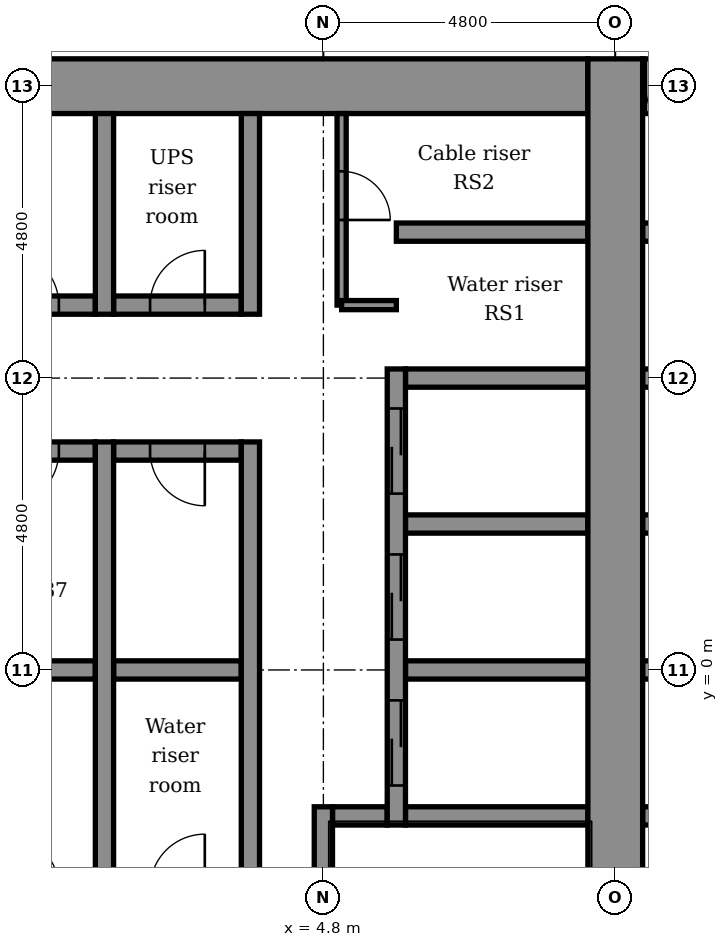
"""IFC4 building model, lengths in metres.
Left out: names, types, materials, properties, quantities, classifications, styles, units other than length and angle.
Written with IfcOpenShell. Run it as: python <this file> out.ifc"""

import sys

from ifc_helpers import new_model, si_unit, direction, frame, frame_2d, origin, place, context, subcontext, project, spatial, rectangle, extrude, element, fill, save


model = new_model("IFC4")
c1 = context("Model", 3, precision=1e-05, world=origin(), true_north=direction((0.0, 1.0)))
c2 = subcontext(c1, "Body", "Model", "MODEL_VIEW")
j1 = project(units=[si_unit("LENGTHUNIT", "METRE"), si_unit("PLANEANGLEUNIT", "RADIAN")], contexts=[c1])
p1 = place(None, origin())
s1 = spatial("IfcSite", under=j1, at=p1, CompositionType="ELEMENT")
p2 = place(p1, origin())
s2 = spatial("IfcBuilding", under=s1, at=p2, CompositionType="ELEMENT")
p3 = place(p2, frame((0.0, 0.0, 95.9)))
s3 = spatial("IfcBuildingStorey", under=s2, at=p3, CompositionType="ELEMENT", Elevation=95.9)
p4 = place(p3, frame((4.95, -2.4, -0.2), z_axis=(0.0, 0.0, 1.0), x_axis=(1.0, 0.0, 0.0)))
e1 = element("IfcWall", 1, at=p4, inside=s3, PredefinedType="STANDARD", context=c2, shape_type="SweptSolid", body=[
    extrude(rectangle(XDim=0.9, YDim=0.3, at=frame_2d((0.45, 0.0))), origin(), (0.0, 0.0, 1.0), 4.5),
])
p5 = place(p3, frame((6.15, -2.4, -0.2), z_axis=(0.0, 0.0, 1.0), x_axis=(1.0, 0.0, 0.0)))
e2 = element("IfcWall", 2, at=p5, inside=s3, PredefinedType="STANDARD", context=c2, shape_type="SweptSolid", body=[
    extrude(rectangle(XDim=3.0, YDim=0.3, at=frame_2d((1.5, 0.0))), origin(), (0.0, 0.0, 1.0), 4.5),
])
p6 = place(p3, frame((10.05, -2.4, -0.2), z_axis=(0.0, 0.0, 1.0), x_axis=(1.0, 0.0, 0.0)))
e3 = element("IfcWall", 3, at=p6, inside=s3, PredefinedType="STANDARD", context=c2, shape_type="SweptSolid", body=[
    extrude(rectangle(XDim=3.9, YDim=0.3, at=frame_2d((1.95, 0.0))), origin(), (0.0, 0.0, 1.0), 4.5),
])
p7 = place(p3, frame((-1.05, 0.0, -0.2), z_axis=(0.0, 0.0, 1.0), x_axis=(1.0, 0.0, 0.0)))
e4 = element("IfcWall", 4, at=p7, inside=s3, PredefinedType="STANDARD", context=c2, shape_type="SweptSolid", body=[
    extrude(rectangle(XDim=2.1, YDim=0.3, at=frame_2d((1.05, 0.0))), origin(), (0.0, 0.0, 1.0), 4.5),
])
p8 = place(p3, frame((1.35, 0.0, -0.2), z_axis=(0.0, 0.0, 1.0), x_axis=(1.0, 0.0, 0.0)))
e5 = element("IfcWall", 5, at=p8, inside=s3, PredefinedType="STANDARD", context=c2, shape_type="SweptSolid", body=[
    extrude(rectangle(XDim=2.1, YDim=0.3, at=frame_2d((1.05, 0.0))), origin(), (0.0, 0.0, 1.0), 4.5),
])
p9 = place(p3, frame((6.15, 0.0, -0.2), z_axis=(0.0, 0.0, 1.0), x_axis=(1.0, 0.0, 0.0)))
e6 = element("IfcWall", 6, at=p9, inside=s3, PredefinedType="STANDARD", context=c2, shape_type="SweptSolid", body=[
    extrude(rectangle(XDim=3.0, YDim=0.3, at=frame_2d((1.5, 0.0))), origin(), (0.0, 0.0, 1.0), 4.5),
])
p10 = place(p3, frame((10.05, 0.0, -0.2), z_axis=(0.0, 0.0, 1.0), x_axis=(1.0, 0.0, 0.0)))
e7 = element("IfcWall", 7, at=p10, inside=s3, PredefinedType="STANDARD", context=c2, shape_type="SweptSolid", body=[
    extrude(rectangle(XDim=3.9, YDim=0.3, at=frame_2d((1.95, 0.0))), origin(), (0.0, 0.0, 1.0), 4.5),
])
p11 = place(p3, frame((6.15, 2.4, -0.2), z_axis=(0.0, 0.0, 1.0), x_axis=(1.0, 0.0, 0.0)))
e8 = element("IfcWall", 8, at=p11, inside=s3, PredefinedType="STANDARD", context=c2, shape_type="SweptSolid", body=[
    extrude(rectangle(XDim=3.0, YDim=0.3, at=frame_2d((1.5, 0.0))), origin(), (0.0, 0.0, 1.0), 4.5),
])
p12 = place(p3, frame((10.05, 2.4, -0.2), z_axis=(0.0, 0.0, 1.0), x_axis=(1.0, 0.0, 0.0)))
e9 = element("IfcWall", 9, at=p12, inside=s3, PredefinedType="STANDARD", context=c2, shape_type="SweptSolid", body=[
    extrude(rectangle(XDim=3.9, YDim=0.3, at=frame_2d((1.95, 0.0))), origin(), (0.0, 0.0, 1.0), 4.5),
])
p13 = place(p3, frame((-1.05, 3.6, -0.2), z_axis=(0.0, 0.0, 1.0), x_axis=(1.0, 0.0, 0.0)))
e10 = element("IfcWall", 10, at=p13, inside=s3, PredefinedType="STANDARD", context=c2, shape_type="SweptSolid", body=[
    extrude(rectangle(XDim=2.1, YDim=0.3, at=frame_2d((1.05, 0.0))), origin(), (0.0, 0.0, 1.0), 4.5),
])
p14 = place(p13, frame((0.6, 0.0, 0.2)))
e11 = element("IfcOpeningElement", 11, at=p14, cuts=e10, PredefinedType="OPENING", context=c2, shape_type="SweptSolid", body=[
    extrude(rectangle(XDim=0.9, YDim=2.1, at=frame_2d((0.45, 1.05))), frame((0.0, 0.16, 0.0), z_axis=(0.0, -1.0, 0.0), x_axis=(1.0, 0.0, 0.0)), (0.0, 0.0, 1.0), 0.32),
])
p15 = place(p3, frame((1.35, 3.6, -0.2), z_axis=(0.0, 0.0, 1.0), x_axis=(1.0, 0.0, 0.0)))
e12 = element("IfcWall", 12, at=p15, inside=s3, PredefinedType="STANDARD", context=c2, shape_type="SweptSolid", body=[
    extrude(rectangle(XDim=2.1, YDim=0.3, at=frame_2d((1.05, 0.0))), origin(), (0.0, 0.0, 1.0), 4.5),
])
p16 = place(p15, frame((0.6, 0.0, 0.2)))
e13 = element("IfcOpeningElement", 13, at=p16, cuts=e12, PredefinedType="OPENING", context=c2, shape_type="SweptSolid", body=[
    extrude(rectangle(XDim=0.9, YDim=2.1, at=frame_2d((0.45, 1.05))), frame((0.0, 0.16, 0.0), z_axis=(0.0, -1.0, 0.0), x_axis=(1.0, 0.0, 0.0)), (0.0, 0.0, 1.0), 0.32),
])
p17 = place(p3, frame((6.15, 4.8, -0.2), z_axis=(0.0, 0.0, 1.0), x_axis=(1.0, 0.0, 0.0)))
e14 = element("IfcWall", 14, at=p17, inside=s3, PredefinedType="STANDARD", context=c2, shape_type="SweptSolid", body=[
    extrude(rectangle(XDim=3.0, YDim=0.3, at=frame_2d((1.5, 0.0))), origin(), (0.0, 0.0, 1.0), 4.5),
])
p18 = place(p3, frame((10.05, 4.8, -0.2), z_axis=(0.0, 0.0, 1.0), x_axis=(1.0, 0.0, 0.0)))
e15 = element("IfcWall", 15, at=p18, inside=s3, PredefinedType="STANDARD", context=c2, shape_type="SweptSolid", body=[
    extrude(rectangle(XDim=3.9, YDim=0.3, at=frame_2d((1.95, 0.0))), origin(), (0.0, 0.0, 1.0), 4.5),
])
p19 = place(p3, frame((-1.05, 6.0, -0.2), z_axis=(0.0, 0.0, 1.0), x_axis=(1.0, 0.0, 0.0)))
e16 = element("IfcWall", 16, at=p19, inside=s3, PredefinedType="STANDARD", context=c2, shape_type="SweptSolid", body=[
    extrude(rectangle(XDim=2.1, YDim=0.3, at=frame_2d((1.05, 0.0))), origin(), (0.0, 0.0, 1.0), 4.5),
])
p20 = place(p19, frame((0.6, 0.0, 0.2)))
e17 = element("IfcOpeningElement", 17, at=p20, cuts=e16, PredefinedType="OPENING", context=c2, shape_type="SweptSolid", body=[
    extrude(rectangle(XDim=0.9, YDim=2.1, at=frame_2d((0.45, 1.05))), frame((0.0, 0.16, 0.0), z_axis=(0.0, -1.0, 0.0), x_axis=(1.0, 0.0, 0.0)), (0.0, 0.0, 1.0), 0.32),
])
p21 = place(p3, frame((1.35, 6.0, -0.2), z_axis=(0.0, 0.0, 1.0), x_axis=(1.0, 0.0, 0.0)))
e18 = element("IfcWall", 18, at=p21, inside=s3, PredefinedType="STANDARD", context=c2, shape_type="SweptSolid", body=[
    extrude(rectangle(XDim=2.1, YDim=0.3, at=frame_2d((1.05, 0.0))), origin(), (0.0, 0.0, 1.0), 4.5),
])
p22 = place(p21, frame((0.6, 0.0, 0.2)))
e19 = element("IfcOpeningElement", 19, at=p22, cuts=e18, PredefinedType="OPENING", context=c2, shape_type="SweptSolid", body=[
    extrude(rectangle(XDim=0.9, YDim=2.1, at=frame_2d((0.45, 1.05))), frame((0.0, 0.16, 0.0), z_axis=(0.0, -1.0, 0.0), x_axis=(1.0, 0.0, 0.0)), (0.0, 0.0, 1.0), 0.32),
])
p23 = place(p3, frame((6.0, 7.2, -0.2), z_axis=(0.0, 0.0, 1.0), x_axis=(1.0, 0.0, 0.0)))
e20 = element("IfcWall", 20, at=p23, inside=s3, PredefinedType="STANDARD", context=c2, shape_type="SweptSolid", body=[
    extrude(rectangle(XDim=3.15, YDim=0.3, at=frame_2d((1.575, 0.0))), origin(), (0.0, 0.0, 1.0), 4.5),
])
p24 = place(p3, frame((10.05, 7.2, -0.2), z_axis=(0.0, 0.0, 1.0), x_axis=(1.0, 0.0, 0.0)))
e21 = element("IfcWall", 21, at=p24, inside=s3, PredefinedType="STANDARD", context=c2, shape_type="SweptSolid", body=[
    extrude(rectangle(XDim=3.9, YDim=0.3, at=frame_2d((1.95, 0.0))), origin(), (0.0, 0.0, 1.0), 4.5),
])
p25 = place(p3, frame((-5.25, 9.6, -0.2), z_axis=(0.0, 0.0, 1.0), x_axis=(1.0, 0.0, 0.0)))
e22 = element("IfcWall", 22, at=p25, inside=s3, PredefinedType="SHEAR", context=c2, shape_type="SweptSolid", body=[
    extrude(rectangle(XDim=14.4, YDim=0.9, at=frame_2d((7.2, 0.0))), origin(), (0.0, 0.0, 1.0), 4.5),
])
p26 = place(p25, frame((0.6, 0.0, 0.2)))
e23 = element("IfcOpeningElement", 23, at=p26, cuts=e22, PredefinedType="OPENING", context=c2, shape_type="SweptSolid", body=[
    extrude(rectangle(XDim=0.9, YDim=2.1, at=frame_2d((0.45, 1.05))), frame((0.0, 0.46, 0.0), z_axis=(0.0, -1.0, 0.0), x_axis=(1.0, 0.0, 0.0)), (0.0, 0.0, 1.0), 0.92),
])
p27 = place(p3, frame((10.05, 9.6, -0.2), z_axis=(0.0, 0.0, 1.0), x_axis=(1.0, 0.0, 0.0)))
e24 = element("IfcWall", 24, at=p27, inside=s3, PredefinedType="SHEAR", context=c2, shape_type="SweptSolid", body=[
    extrude(rectangle(XDim=3.9, YDim=0.9, at=frame_2d((1.95, 0.0))), origin(), (0.0, 0.0, 1.0), 4.5),
])
p28 = place(p27, frame((0.05, 0.0, 0.2)))
e25 = element("IfcOpeningElement", 25, at=p28, cuts=e24, PredefinedType="OPENING", context=c2, shape_type="SweptSolid", body=[
    extrude(rectangle(XDim=0.9, YDim=2.1, at=frame_2d((0.45, 1.05))), frame((0.0, 0.46, 0.0), z_axis=(0.0, -1.0, 0.0), x_axis=(1.0, 0.0, 0.0)), (0.0, 0.0, 1.0), 0.92),
])
p29 = place(p27, frame((1.5, 0.0, 0.2)))
e26 = element("IfcOpeningElement", 26, at=p29, cuts=e24, PredefinedType="OPENING", context=c2, shape_type="SweptSolid", body=[
    extrude(rectangle(XDim=0.9, YDim=2.1, at=frame_2d((0.45, 1.05))), frame((0.0, 0.46, 0.0), z_axis=(0.0, -1.0, 0.0), x_axis=(1.0, 0.0, 0.0)), (0.0, 0.0, 1.0), 0.92),
])
p30 = place(p27, frame((2.95, 0.0, 0.2)))
e27 = element("IfcOpeningElement", 27, at=p30, cuts=e24, PredefinedType="OPENING", context=c2, shape_type="SweptSolid", body=[
    extrude(rectangle(XDim=0.9, YDim=2.1, at=frame_2d((0.45, 1.05))), frame((0.0, 0.46, 0.0), z_axis=(0.0, -1.0, 0.0), x_axis=(1.0, 0.0, 0.0)), (0.0, 0.0, 1.0), 0.92),
])
p31 = place(p3, frame((1.2, -3.75, -0.2), z_axis=(0.0, 0.0, 1.0), x_axis=(0.0, 1.0, 0.0)))
e28 = element("IfcWall", 28, at=p31, inside=s3, PredefinedType="STANDARD", context=c2, shape_type="SweptSolid", body=[
    extrude(rectangle(XDim=7.5, YDim=0.3, at=frame_2d((3.75, 0.0))), origin(), (0.0, 0.0, 1.0), 4.5),
])
p32 = place(p3, frame((1.2, 5.85, -0.2), z_axis=(0.0, 0.0, 1.0), x_axis=(0.0, 1.0, 0.0)))
e29 = element("IfcWall", 29, at=p32, inside=s3, PredefinedType="STANDARD", context=c2, shape_type="SweptSolid", body=[
    extrude(rectangle(XDim=3.3, YDim=0.3, at=frame_2d((1.65, 0.0))), origin(), (0.0, 0.0, 1.0), 4.5),
])
p33 = place(p3, frame((3.6, -3.75, -0.2), z_axis=(0.0, 0.0, 1.0), x_axis=(0.0, 1.0, 0.0)))
e30 = element("IfcWall", 30, at=p33, inside=s3, PredefinedType="STANDARD", context=c2, shape_type="SweptSolid", body=[
    extrude(rectangle(XDim=7.5, YDim=0.3, at=frame_2d((3.75, 0.0))), origin(), (0.0, 0.0, 1.0), 4.5),
])
p34 = place(p3, frame((3.6, 5.85, -0.2), z_axis=(0.0, 0.0, 1.0), x_axis=(0.0, 1.0, 0.0)))
e31 = element("IfcWall", 31, at=p34, inside=s3, PredefinedType="STANDARD", context=c2, shape_type="SweptSolid", body=[
    extrude(rectangle(XDim=3.3, YDim=0.3, at=frame_2d((1.65, 0.0))), origin(), (0.0, 0.0, 1.0), 4.5),
])
p35 = place(p3, frame((4.8, -9.15, -0.2), z_axis=(0.0, 0.0, 1.0), x_axis=(0.0, 1.0, 0.0)))
e32 = element("IfcWall", 32, at=p35, inside=s3, PredefinedType="STANDARD", context=c2, shape_type="SweptSolid", body=[
    extrude(rectangle(XDim=6.9, YDim=0.3, at=frame_2d((3.45, 0.0))), origin(), (0.0, 0.0, 1.0), 4.5),
])
p36 = place(p35, frame((3.7, 0.0, 0.2)))
e33 = element("IfcOpeningElement", 33, at=p36, cuts=e32, PredefinedType="OPENING", context=c2, shape_type="SweptSolid", body=[
    extrude(rectangle(XDim=1.2, YDim=2.1, at=frame_2d((0.6, 1.05))), frame((0.0, 0.16, 0.0), z_axis=(0.0, -1.0, 0.0), x_axis=(1.0, 0.0, 0.0)), (0.0, 0.0, 1.0), 0.32),
])
p37 = place(p3, frame((6.0, -2.55, -0.2), z_axis=(0.0, 0.0, 1.0), x_axis=(0.0, 1.0, 0.0)))
e34 = element("IfcWall", 34, at=p37, inside=s3, PredefinedType="STANDARD", context=c2, shape_type="SweptSolid", body=[
    extrude(rectangle(XDim=7.5, YDim=0.3, at=frame_2d((3.75, 0.0))), origin(), (0.0, 0.0, 1.0), 4.5),
])
p38 = place(p37, frame((0.65, 0.0, 0.2)))
e35 = element("IfcOpeningElement", 35, at=p38, cuts=e34, PredefinedType="OPENING", context=c2, shape_type="SweptSolid", body=[
    extrude(rectangle(XDim=1.4, YDim=2.1, at=frame_2d((0.7, 1.05))), frame((0.0, 0.16, 0.0), z_axis=(0.0, -1.0, 0.0), x_axis=(1.0, 0.0, 0.0)), (0.0, 0.0, 1.0), 0.32),
])
p39 = place(p37, frame((3.05, 0.0, 0.2)))
e36 = element("IfcOpeningElement", 36, at=p39, cuts=e34, PredefinedType="OPENING", context=c2, shape_type="SweptSolid", body=[
    extrude(rectangle(XDim=1.4, YDim=2.1, at=frame_2d((0.7, 1.05))), frame((0.0, 0.16, 0.0), z_axis=(0.0, -1.0, 0.0), x_axis=(1.0, 0.0, 0.0)), (0.0, 0.0, 1.0), 0.32),
])
p40 = place(p37, frame((5.45, 0.0, 0.2)))
e37 = element("IfcOpeningElement", 37, at=p40, cuts=e34, PredefinedType="OPENING", context=c2, shape_type="SweptSolid", body=[
    extrude(rectangle(XDim=1.4, YDim=2.1, at=frame_2d((0.7, 1.05))), frame((0.0, 0.16, 0.0), z_axis=(0.0, -1.0, 0.0), x_axis=(1.0, 0.0, 0.0)), (0.0, 0.0, 1.0), 0.32),
])
p41 = place(p3, frame((9.6, -10.15, -0.2), z_axis=(0.0, 0.0, 1.0), x_axis=(0.0, 1.0, 0.0)))
e38 = element("IfcWall", 38, at=p41, inside=s3, PredefinedType="SHEAR", context=c2, shape_type="SweptSolid", body=[
    extrude(rectangle(XDim=20.2, YDim=0.9, at=frame_2d((10.1, 0.0))), origin(), (0.0, 0.0, 1.0), 4.5),
])
p42 = place(p3, frame((5.1, 6.0, 0.0), z_axis=(0.0, 0.0, 1.0), x_axis=(0.0, 1.0, 0.0)))
e39 = element("IfcWall", 39, at=p42, inside=s3, PredefinedType="PARTITIONING", context=c2, shape_type="SweptSolid", body=[
    extrude(rectangle(XDim=3.15, YDim=0.15, at=frame_2d((1.575, 0.0))), origin(), (0.0, 0.0, 1.0), 4.3),
])
p43 = place(p42, frame((1.4, 0.0, 0.0)))
e40 = element("IfcOpeningElement", 40, at=p43, cuts=e39, PredefinedType="OPENING", context=c2, shape_type="SweptSolid", body=[
    extrude(rectangle(XDim=0.8, YDim=2.1, at=frame_2d((0.4, 1.05))), frame((0.0, 0.085, 0.0), z_axis=(0.0, -1.0, 0.0), x_axis=(1.0, 0.0, 0.0)), (0.0, 0.0, 1.0), 0.17),
])
p44 = place(p3, frame((5.1, 6.0, 0.0), z_axis=(0.0, 0.0, 1.0), x_axis=(1.0, 0.0, 0.0)))
e41 = element("IfcWall", 41, at=p44, inside=s3, PredefinedType="PARTITIONING", context=c2, shape_type="SweptSolid", body=[
    extrude(rectangle(XDim=0.9, YDim=0.15, at=frame_2d((0.45, 0.0))), origin(), (0.0, 0.0, 1.0), 4.3),
])
p45 = place(p43, frame((0.8, 0.0, 0.0), z_axis=(0.0, 0.0, 1.0), x_axis=(-1.0, 0.0, 0.0)))
e42 = element("IfcDoor", 42, at=p45, inside=s3, OperationType="SINGLE_SWING_LEFT", PredefinedType="DOOR", context=c2, shape_type="SweptSolid", body=[
    extrude(rectangle(XDim=0.8, YDim=2.1, at=frame_2d((0.4, 1.05))), frame((0.0, 0.025, 0.0), z_axis=(0.0, -1.0, 0.0), x_axis=(1.0, 0.0, 0.0)), (0.0, 0.0, 1.0), 0.05),
])
fill(e40, e42)
p46 = place(p38, origin())
e43 = element("IfcDoor", 43, at=p46, inside=s3, OperationType="DOUBLE_DOOR_SLIDING", PredefinedType="DOOR", context=c2, shape_type="SweptSolid", body=[
    extrude(rectangle(XDim=1.4, YDim=2.1, at=frame_2d((0.7, 1.05))), frame((0.0, 0.025, 0.0), z_axis=(0.0, -1.0, 0.0), x_axis=(1.0, 0.0, 0.0)), (0.0, 0.0, 1.0), 0.05),
])
fill(e35, e43)
p47 = place(p39, origin())
e44 = element("IfcDoor", 44, at=p47, inside=s3, OperationType="DOUBLE_DOOR_SLIDING", PredefinedType="DOOR", context=c2, shape_type="SweptSolid", body=[
    extrude(rectangle(XDim=1.4, YDim=2.1, at=frame_2d((0.7, 1.05))), frame((0.0, 0.025, 0.0), z_axis=(0.0, -1.0, 0.0), x_axis=(1.0, 0.0, 0.0)), (0.0, 0.0, 1.0), 0.05),
])
fill(e36, e44)
p48 = place(p40, origin())
e45 = element("IfcDoor", 45, at=p48, inside=s3, OperationType="DOUBLE_DOOR_SLIDING", PredefinedType="DOOR", context=c2, shape_type="SweptSolid", body=[
    extrude(rectangle(XDim=1.4, YDim=2.1, at=frame_2d((0.7, 1.05))), frame((0.0, 0.025, 0.0), z_axis=(0.0, -1.0, 0.0), x_axis=(1.0, 0.0, 0.0)), (0.0, 0.0, 1.0), 0.05),
])
fill(e37, e45)
p49 = place(p20, origin())
e46 = element("IfcDoor", 46, at=p49, inside=s3, OperationType="SINGLE_SWING_LEFT", PredefinedType="DOOR", context=c2, shape_type="SweptSolid", body=[
    extrude(rectangle(XDim=0.9, YDim=2.1, at=frame_2d((0.45, 1.05))), frame((0.0, 0.025, 0.0), z_axis=(0.0, -1.0, 0.0), x_axis=(1.0, 0.0, 0.0)), (0.0, 0.0, 1.0), 0.05),
])
fill(e17, e46)
p50 = place(p22, origin())
e47 = element("IfcDoor", 47, at=p50, inside=s3, OperationType="SINGLE_SWING_RIGHT", PredefinedType="DOOR", context=c2, shape_type="SweptSolid", body=[
    extrude(rectangle(XDim=0.9, YDim=2.1, at=frame_2d((0.45, 1.05))), frame((0.0, 0.025, 0.0), z_axis=(0.0, -1.0, 0.0), x_axis=(1.0, 0.0, 0.0)), (0.0, 0.0, 1.0), 0.05),
])
fill(e19, e47)
p51 = place(p14, frame((0.9, 0.0, 0.0), z_axis=(0.0, 0.0, 1.0), x_axis=(-1.0, 0.0, 0.0)))
e48 = element("IfcDoor", 48, at=p51, inside=s3, OperationType="SINGLE_SWING_LEFT", PredefinedType="DOOR", context=c2, shape_type="SweptSolid", body=[
    extrude(rectangle(XDim=0.9, YDim=2.1, at=frame_2d((0.45, 1.05))), frame((0.0, 0.025, 0.0), z_axis=(0.0, -1.0, 0.0), x_axis=(1.0, 0.0, 0.0)), (0.0, 0.0, 1.0), 0.05),
])
fill(e11, e48)
p52 = place(p16, frame((0.9, 0.0, 0.0), z_axis=(0.0, 0.0, 1.0), x_axis=(-1.0, 0.0, 0.0)))
e49 = element("IfcDoor", 49, at=p52, inside=s3, OperationType="SINGLE_SWING_RIGHT", PredefinedType="DOOR", context=c2, shape_type="SweptSolid", body=[
    extrude(rectangle(XDim=0.9, YDim=2.1, at=frame_2d((0.45, 1.05))), frame((0.0, 0.025, 0.0), z_axis=(0.0, -1.0, 0.0), x_axis=(1.0, 0.0, 0.0)), (0.0, 0.0, 1.0), 0.05),
])
fill(e13, e49)
p53 = place(p28, frame((0.9, 0.0, 0.0), z_axis=(0.0, 0.0, 1.0), x_axis=(-1.0, 0.0, 0.0)))
e50 = element("IfcDoor", 50, at=p53, inside=s3, OperationType="SINGLE_SWING_RIGHT", PredefinedType="DOOR", context=c2, shape_type="SweptSolid", body=[
    extrude(rectangle(XDim=0.9, YDim=2.1, at=frame_2d((0.45, 1.05))), frame((0.0, 0.025, 0.0), z_axis=(0.0, -1.0, 0.0), x_axis=(1.0, 0.0, 0.0)), (0.0, 0.0, 1.0), 0.05),
])
fill(e25, e50)
save(model, sys.argv[1])
